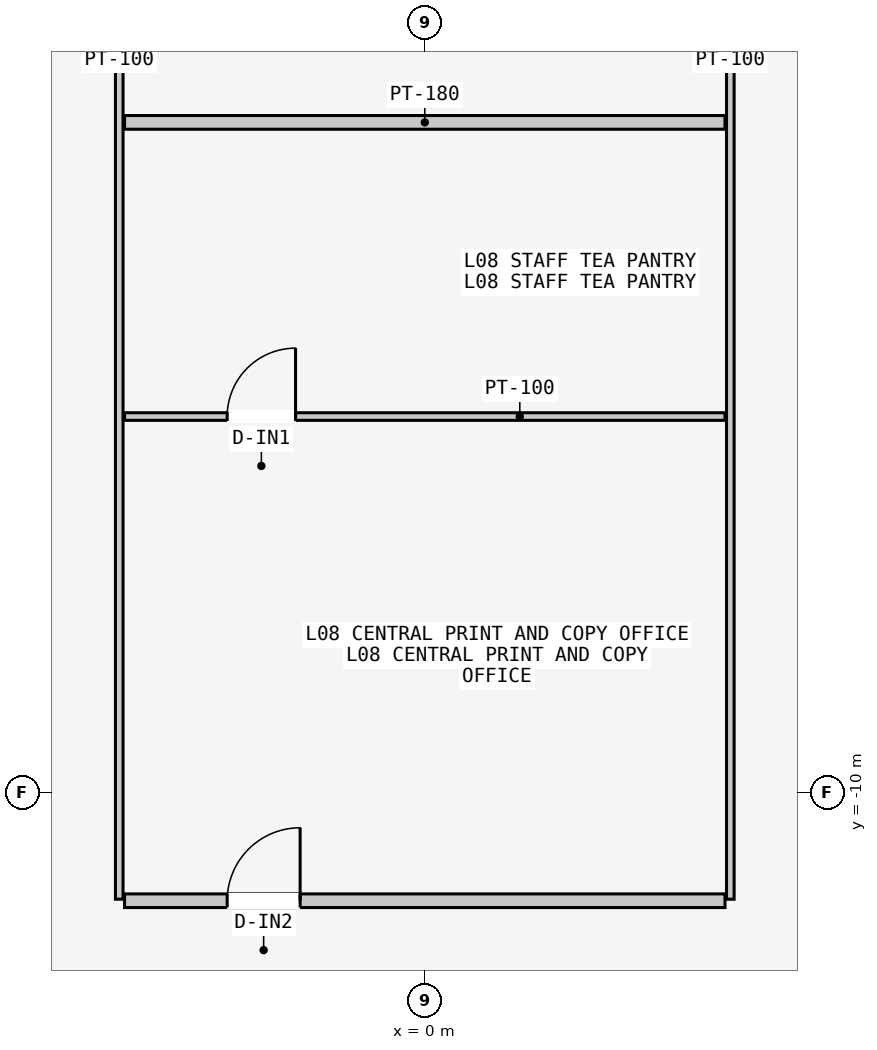
"""IFC4 building model, lengths in metres.
Left out: names, types, materials, properties, quantities, classifications, styles, units other than length and angle.
Written with IfcOpenShell. Run it as: python <this file> out.ifc"""

import sys

from ifc_helpers import new_model, si_unit, direction, frame, frame_2d, origin, place, context, subcontext, project, spatial, rectangle, extrude, element, fill, save


model = new_model("IFC4")
c1 = context("Model", 3, precision=1e-05, world=origin(), true_north=direction((0.0, 1.0)))
c2 = subcontext(c1, "Body", "Model", "MODEL_VIEW")
j1 = project(units=[si_unit("LENGTHUNIT", "METRE"), si_unit("PLANEANGLEUNIT", "RADIAN")], contexts=[c1])
p1 = place(None, origin())
s1 = spatial("IfcSite", under=j1, at=p1, CompositionType="ELEMENT")
p2 = place(p1, origin())
s2 = spatial("IfcBuilding", under=s1, at=p2, CompositionType="ELEMENT")
p3 = place(p2, frame((0.0, 0.0, 34.8)))
s3 = spatial("IfcBuildingStorey", under=s2, at=p3, CompositionType="ELEMENT", Elevation=34.8)
for number, where, z_axis, x_axis in (
    (1, (-4.02, -11.4, 0.0), (0.0, 0.0, 1.0), (0.0, 1.0, 0.0)),
    (2, (4.02, -11.4, 0.0), (0.0, 0.0, 1.0), (0.0, 1.0, 0.0)),
):
    element("IfcWall", number, at=place(p3, frame(where, z_axis=z_axis, x_axis=x_axis)), inside=s3, PredefinedType="PARTITIONING", context=c2, shape_type="SweptSolid", body=[
        extrude(rectangle(XDim=22.8, YDim=0.1, at=frame_2d((11.4, 0.0))), origin(), (0.0, 0.0, 1.0), 3.4),
    ])
p4 = place(p3, frame((-3.95, -1.18, 0.0), z_axis=(0.0, 0.0, 1.0), x_axis=(1.0, 0.0, 0.0)))
e3 = element("IfcWall", 3, at=p4, inside=s3, PredefinedType="PARTITIONING", context=c2, shape_type="SweptSolid", body=[
    extrude(rectangle(XDim=7.9, YDim=0.18, at=frame_2d((3.95, 0.0))), origin(), (0.0, 0.0, 1.0), 3.4),
])
p5 = place(p3, frame((-3.95, -11.42, 0.0), z_axis=(0.0, 0.0, 1.0), x_axis=(1.0, 0.0, 0.0)))
e4 = element("IfcWall", 4, at=p5, inside=s3, PredefinedType="PARTITIONING", context=c2, shape_type="SweptSolid", body=[
    extrude(rectangle(XDim=7.9, YDim=0.18, at=frame_2d((3.95, 0.0))), origin(), (0.0, 0.0, 1.0), 3.4),
])
p6 = place(p5, frame((1.35, 0.0, 0.0)))
e5 = element("IfcOpeningElement", 5, at=p6, cuts=e4, PredefinedType="OPENING", context=c2, shape_type="SweptSolid", body=[
    extrude(rectangle(XDim=0.96, YDim=2.18, at=frame_2d((0.48, 1.09))), frame((0.0, 0.1, 0.0), z_axis=(0.0, -1.0, 0.0), x_axis=(1.0, 0.0, 0.0)), (0.0, 0.0, 1.0), 0.2),
])
p7 = place(p3, frame((-3.95, -5.05, 0.0), z_axis=(0.0, 0.0, 1.0), x_axis=(1.0, 0.0, 0.0)))
e6 = element("IfcWall", 6, at=p7, inside=s3, PredefinedType="PARTITIONING", context=c2, shape_type="SweptSolid", body=[
    extrude(rectangle(XDim=7.9, YDim=0.1, at=frame_2d((3.95, 0.0))), origin(), (0.0, 0.0, 1.0), 3.4),
])
p8 = place(p7, frame((1.35, 0.0, 0.0)))
e7 = element("IfcOpeningElement", 7, at=p8, cuts=e6, PredefinedType="OPENING", context=c2, shape_type="SweptSolid", body=[
    extrude(rectangle(XDim=0.9, YDim=2.15, at=frame_2d((0.45, 1.075))), frame((0.0, 0.06, 0.0), z_axis=(0.0, -1.0, 0.0), x_axis=(1.0, 0.0, 0.0)), (0.0, 0.0, 1.0), 0.12),
])
p9 = place(p6, origin())
e8 = element("IfcDoor", 8, at=p9, inside=s3, OperationType="SINGLE_SWING_RIGHT", PredefinedType="DOOR", context=c2, shape_type="SweptSolid", body=[
    extrude(rectangle(XDim=0.96, YDim=2.18, at=frame_2d((0.48, 1.09))), frame((0.0, 0.025, 0.0), z_axis=(0.0, -1.0, 0.0), x_axis=(1.0, 0.0, 0.0)), (0.0, 0.0, 1.0), 0.05),
])
fill(e5, e8)
p10 = place(p8, origin())
e9 = element("IfcDoor", 9, at=p10, inside=s3, OperationType="SINGLE_SWING_RIGHT", PredefinedType="DOOR", context=c2, shape_type="SweptSolid", body=[
    extrude(rectangle(XDim=0.9, YDim=2.15, at=frame_2d((0.45, 1.075))), frame((0.0, 0.025, 0.0), z_axis=(0.0, -1.0, 0.0), x_axis=(1.0, 0.0, 0.0)), (0.0, 0.0, 1.0), 0.05),
])
fill(e7, e9)
save(model, sys.argv[1])
